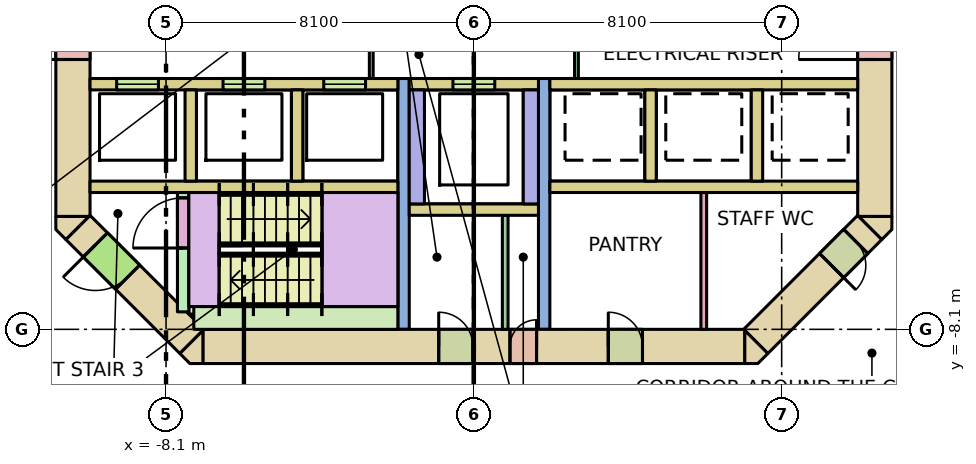
"""IFC4 building model, lengths in metres.
Left out: names, types, materials, properties, quantities, classifications, styles, units other than length and angle.
Written with IfcOpenShell. Run it as: python <this file> out.ifc"""

import sys

from ifc_helpers import new_model, si_unit, direction, frame, frame_2d, origin, place, context, subcontext, project, spatial, polyline, rectangle, outline, extrude, element, fill, save


model = new_model("IFC4")
c1 = context("Model", 3, precision=1e-05, world=origin(), true_north=direction((0.0, 1.0)))
c2 = subcontext(c1, "Body", "Model", "MODEL_VIEW")
j1 = project(units=[si_unit("LENGTHUNIT", "METRE"), si_unit("PLANEANGLEUNIT", "RADIAN")], contexts=[c1])
p1 = place(None, origin())
s1 = spatial("IfcSite", under=j1, at=p1, CompositionType="ELEMENT")
p2 = place(p1, origin())
s2 = spatial("IfcBuilding", under=s1, at=p2, CompositionType="ELEMENT")
p3 = place(p2, frame((0.0, 0.0, 6.0)))
s3 = spatial("IfcBuildingStorey", under=s2, at=p3, CompositionType="ELEMENT", Elevation=6.0)
p4 = place(p3, frame((-7.13, -8.55, -0.32), z_axis=(0.0, 0.0, 1.0), x_axis=(1.0, 0.0, 0.0)))
e1 = element("IfcWall", 1, at=p4, inside=s3, PredefinedType="SHEAR", context=c2, shape_type="SweptSolid", body=[
    extrude(rectangle(XDim=14.26, YDim=0.9, at=frame_2d((7.13, 0.0))), origin(), (0.0, 0.0, 1.0), 7.0),
])
p5 = place(p4, frame((8.08, 0.0, 0.32)))
e2 = element("IfcOpeningElement", 2, at=p5, cuts=e1, PredefinedType="OPENING", context=c2, shape_type="SweptSolid", body=[
    extrude(rectangle(XDim=0.7, YDim=2.1, at=frame_2d((0.35, 1.05))), frame((0.0, 0.46, 0.0), z_axis=(0.0, -1.0, 0.0), x_axis=(1.0, 0.0, 0.0)), (0.0, 0.0, 1.0), 0.92),
])
p6 = place(p4, frame((6.205, 0.0, 0.32)))
e3 = element("IfcOpeningElement", 3, at=p6, cuts=e1, PredefinedType="OPENING", context=c2, shape_type="SweptSolid", body=[
    extrude(rectangle(XDim=0.9, YDim=2.1, at=frame_2d((0.45, 1.05))), frame((0.0, 0.46, 0.0), z_axis=(0.0, -1.0, 0.0), x_axis=(1.0, 0.0, 0.0)), (0.0, 0.0, 1.0), 0.92),
])
p7 = place(p4, frame((10.667, 0.0, 0.32)))
e4 = element("IfcOpeningElement", 4, at=p7, cuts=e1, PredefinedType="OPENING", context=c2, shape_type="SweptSolid", body=[
    extrude(rectangle(XDim=0.9, YDim=2.1, at=frame_2d((0.45, 1.05))), frame((0.0, 0.46, 0.0), z_axis=(0.0, -1.0, 0.0), x_axis=(1.0, 0.0, 0.0)), (0.0, 0.0, 1.0), 0.92),
])
p8 = place(p3, frame((-10.55, -5.13, -0.32), z_axis=(0.0, 0.0, 1.0), x_axis=(0.0, 1.0, 0.0)))
e5 = element("IfcWall", 5, at=p8, inside=s3, PredefinedType="SHEAR", context=c2, shape_type="SweptSolid", body=[
    extrude(rectangle(XDim=10.26, YDim=0.9, at=frame_2d((5.13, 0.0))), origin(), (0.0, 0.0, 1.0), 7.0),
])
p9 = place(p8, frame((4.13, 0.0, 0.32)))
e6 = element("IfcOpeningElement", 6, at=p9, cuts=e5, PredefinedType="OPENING", context=c2, shape_type="SweptSolid", body=[
    extrude(rectangle(XDim=2.0, YDim=2.1, at=frame_2d((1.0, 1.05))), frame((0.0, 0.46, 0.0), z_axis=(0.0, -1.0, 0.0), x_axis=(1.0, 0.0, 0.0)), (0.0, 0.0, 1.0), 0.92),
])
p10 = place(p3, frame((10.55, -5.13, -0.32), z_axis=(0.0, 0.0, 1.0), x_axis=(0.0, 1.0, 0.0)))
e7 = element("IfcWall", 7, at=p10, inside=s3, PredefinedType="SHEAR", context=c2, shape_type="SweptSolid", body=[
    extrude(rectangle(XDim=10.26, YDim=0.9, at=frame_2d((5.13, 0.0))), origin(), (0.0, 0.0, 1.0), 7.0),
])
p11 = place(p10, frame((4.13, 0.0, 0.32)))
e8 = element("IfcOpeningElement", 8, at=p11, cuts=e7, PredefinedType="OPENING", context=c2, shape_type="SweptSolid", body=[
    extrude(rectangle(XDim=2.0, YDim=2.1, at=frame_2d((1.0, 1.05))), frame((0.0, 0.46, 0.0), z_axis=(0.0, -1.0, 0.0), x_axis=(1.0, 0.0, 0.0)), (0.0, 0.0, 1.0), 0.92),
])
p12 = place(p3, frame((10.418, -5.418, -0.32), z_axis=(0.0, 0.0, 1.0), x_axis=(-0.707106781187, -0.707106781187, 0.0)))
e9 = element("IfcWall", 9, at=p12, inside=s3, PredefinedType="SHEAR", context=c2, shape_type="SweptSolid", body=[
    extrude(rectangle(XDim=4.243, YDim=0.9, at=frame_2d((2.121, 0.0))), origin(), (0.0, 0.0, 1.0), 7.0),
])
p13 = place(p12, frame((0.52, 0.0, 0.32)))
e10 = element("IfcOpeningElement", 10, at=p13, cuts=e9, PredefinedType="OPENING", context=c2, shape_type="SweptSolid", body=[
    extrude(rectangle(XDim=0.9, YDim=2.1, at=frame_2d((0.45, 1.05))), frame((0.0, 0.46, 0.0), z_axis=(0.0, -1.0, 0.0), x_axis=(1.0, 0.0, 0.0)), (0.0, 0.0, 1.0), 0.92),
])
p14 = place(p3, frame((-7.418, -8.418, -0.32), z_axis=(0.0, 0.0, 1.0), x_axis=(-0.707106781187, 0.707106781187, 0.0)))
e11 = element("IfcWall", 11, at=p14, inside=s3, PredefinedType="SHEAR", context=c2, shape_type="SweptSolid", body=[
    extrude(rectangle(XDim=4.243, YDim=0.9, at=frame_2d((2.121, 0.0))), origin(), (0.0, 0.0, 1.0), 7.0),
])
p15 = place(p14, frame((2.393, 0.0, 0.32)))
e12 = element("IfcOpeningElement", 12, at=p15, cuts=e11, PredefinedType="OPENING", context=c2, shape_type="SweptSolid", body=[
    extrude(rectangle(XDim=1.2, YDim=2.1, at=frame_2d((0.6, 1.05))), frame((0.0, 0.46, 0.0), z_axis=(0.0, -1.0, 0.0), x_axis=(1.0, 0.0, 0.0)), (0.0, 0.0, 1.0), 0.92),
])
p16 = place(p3, frame((0.0, 0.0, -0.32)))
e13 = element("IfcWall", 13, at=p16, inside=s3, PredefinedType="SHEAR", context=c2, shape_type="SweptSolid", body=[
    extrude(outline(polyline([(-7.473, -9.0), (-7.736, -8.736), (-7.13, -8.13), (-7.13, -9.0), (-7.473, -9.0)])), origin(), (0.0, 0.0, 1.0), 7.0),
])
p17 = place(p3, frame((0.0, 0.0, -0.32)))
e14 = element("IfcWall", 14, at=p17, inside=s3, PredefinedType="SHEAR", context=c2, shape_type="SweptSolid", body=[
    extrude(outline(polyline([(7.473, -9.0), (7.13, -9.0), (7.13, -8.13), (7.736, -8.736), (7.473, -9.0)])), origin(), (0.0, 0.0, 1.0), 7.0),
])
p18 = place(p3, frame((0.0, 0.0, -0.32)))
e15 = element("IfcWall", 15, at=p18, inside=s3, PredefinedType="SHEAR", context=c2, shape_type="SweptSolid", body=[
    extrude(outline(polyline([(-11.0, -5.473), (-11.0, -5.13), (-10.13, -5.13), (-10.736, -5.736), (-11.0, -5.473)])), origin(), (0.0, 0.0, 1.0), 7.0),
])
p19 = place(p3, frame((0.0, 0.0, -0.32)))
e16 = element("IfcWall", 16, at=p19, inside=s3, PredefinedType="SHEAR", context=c2, shape_type="SweptSolid", body=[
    extrude(outline(polyline([(11.0, -5.473), (10.736, -5.736), (10.13, -5.13), (11.0, -5.13), (11.0, -5.473)])), origin(), (0.0, 0.0, 1.0), 7.0),
])
for number, where, z_axis, x_axis in (
    (17, (-10.1, -4.35, 0.0), (0.0, 0.0, 1.0), (1.0, 0.0, 0.0)),
    (18, (2.0, -4.35, 0.0), (0.0, 0.0, 1.0), (1.0, 0.0, 0.0)),
):
    element("IfcWall", number, at=place(p3, frame(where, z_axis=z_axis, x_axis=x_axis)), inside=s3, PredefinedType="SOLIDWALL", context=c2, shape_type="SweptSolid", body=[
        extrude(rectangle(XDim=8.1, YDim=0.3, at=frame_2d((4.05, 0.0))), origin(), (0.0, 0.0, 1.0), 6.68),
    ])
p20 = place(p3, frame((-10.1, -1.65, 0.0), z_axis=(0.0, 0.0, 1.0), x_axis=(1.0, 0.0, 0.0)))
e19 = element("IfcWall", 19, at=p20, inside=s3, PredefinedType="SOLIDWALL", context=c2, shape_type="SweptSolid", body=[
    extrude(rectangle(XDim=8.1, YDim=0.3, at=frame_2d((4.05, 0.0))), origin(), (0.0, 0.0, 1.0), 6.68),
])
p21 = place(p20, frame((0.7, 0.0, 0.0)))
e20 = element("IfcOpeningElement", 20, at=p21, cuts=e19, PredefinedType="OPENING", context=c2, shape_type="SweptSolid", body=[
    extrude(rectangle(XDim=1.1, YDim=2.1, at=frame_2d((0.55, 1.05))), frame((0.0, 0.16, 0.0), z_axis=(0.0, -1.0, 0.0), x_axis=(1.0, 0.0, 0.0)), (0.0, 0.0, 1.0), 0.32),
])
p22 = place(p20, frame((3.5, 0.0, 0.0)))
e21 = element("IfcOpeningElement", 21, at=p22, cuts=e19, PredefinedType="OPENING", context=c2, shape_type="SweptSolid", body=[
    extrude(rectangle(XDim=1.1, YDim=2.1, at=frame_2d((0.55, 1.05))), frame((0.0, 0.16, 0.0), z_axis=(0.0, -1.0, 0.0), x_axis=(1.0, 0.0, 0.0)), (0.0, 0.0, 1.0), 0.32),
])
p23 = place(p20, frame((6.15, 0.0, 0.0)))
e22 = element("IfcOpeningElement", 22, at=p23, cuts=e19, PredefinedType="OPENING", context=c2, shape_type="SweptSolid", body=[
    extrude(rectangle(XDim=1.1, YDim=2.1, at=frame_2d((0.55, 1.05))), frame((0.0, 0.16, 0.0), z_axis=(0.0, -1.0, 0.0), x_axis=(1.0, 0.0, 0.0)), (0.0, 0.0, 1.0), 0.32),
])
p24 = place(p3, frame((2.0, -1.65, 0.0), z_axis=(0.0, 0.0, 1.0), x_axis=(1.0, 0.0, 0.0)))
e23 = element("IfcWall", 23, at=p24, inside=s3, PredefinedType="SOLIDWALL", context=c2, shape_type="SweptSolid", body=[
    extrude(rectangle(XDim=8.1, YDim=0.3, at=frame_2d((4.05, 0.0))), origin(), (0.0, 0.0, 1.0), 6.68),
])
for number, where, z_axis, x_axis in (
    (24, (-7.45, -4.2, 0.0), (0.0, 0.0, 1.0), (0.0, 1.0, 0.0)),
    (25, (-4.65, -4.2, 0.0), (0.0, 0.0, 1.0), (0.0, 1.0, 0.0)),
    (26, (4.65, -4.2, 0.0), (0.0, 0.0, 1.0), (0.0, 1.0, 0.0)),
    (27, (7.45, -4.2, 0.0), (0.0, 0.0, 1.0), (0.0, 1.0, 0.0)),
):
    element("IfcWall", number, at=place(p3, frame(where, z_axis=z_axis, x_axis=x_axis)), inside=s3, PredefinedType="SOLIDWALL", context=c2, shape_type="SweptSolid", body=[
        extrude(rectangle(XDim=2.4, YDim=0.3, at=frame_2d((1.2, 0.0))), origin(), (0.0, 0.0, 1.0), 6.68),
    ])
for number, where, z_axis, x_axis in (
    (28, (-1.85, -8.1, 0.0), (0.0, 0.0, 1.0), (0.0, 1.0, 0.0)),
    (29, (1.85, -8.1, 0.0), (0.0, 0.0, 1.0), (0.0, 1.0, 0.0)),
):
    element("IfcWall", number, at=place(p3, frame(where, z_axis=z_axis, x_axis=x_axis)), inside=s3, PredefinedType="SHEAR", context=c2, shape_type="SweptSolid", body=[
        extrude(rectangle(XDim=6.6, YDim=0.3, at=frame_2d((3.3, 0.0))), origin(), (0.0, 0.0, 1.0), 6.68),
    ])
p25 = place(p3, frame((-1.7, -1.65, 0.0), z_axis=(0.0, 0.0, 1.0), x_axis=(1.0, 0.0, 0.0)))
e30 = element("IfcWall", 30, at=p25, inside=s3, PredefinedType="SOLIDWALL", context=c2, shape_type="SweptSolid", body=[
    extrude(rectangle(XDim=3.4, YDim=0.3, at=frame_2d((1.7, 0.0))), origin(), (0.0, 0.0, 1.0), 6.68),
])
p26 = place(p25, frame((1.15, 0.0, 0.0)))
e31 = element("IfcOpeningElement", 31, at=p26, cuts=e30, PredefinedType="OPENING", context=c2, shape_type="SweptSolid", body=[
    extrude(rectangle(XDim=1.1, YDim=2.1, at=frame_2d((0.55, 1.05))), frame((0.0, 0.16, 0.0), z_axis=(0.0, -1.0, 0.0), x_axis=(1.0, 0.0, 0.0)), (0.0, 0.0, 1.0), 0.32),
])
for number, where, z_axis, x_axis in (
    (32, (-1.5, -4.8, 0.0), (0.0, 0.0, 1.0), (0.0, 1.0, 0.0)),
    (33, (1.5, -4.8, 0.0), (0.0, 0.0, 1.0), (0.0, 1.0, 0.0)),
):
    element("IfcWall", number, at=place(p3, frame(where, z_axis=z_axis, x_axis=x_axis)), inside=s3, PredefinedType="SOLIDWALL", context=c2, shape_type="SweptSolid", body=[
        extrude(rectangle(XDim=3.0, YDim=0.4, at=frame_2d((1.5, 0.0))), origin(), (0.0, 0.0, 1.0), 6.68),
    ])
p27 = place(p3, frame((-1.7, -4.95, 0.0), z_axis=(0.0, 0.0, 1.0), x_axis=(1.0, 0.0, 0.0)))
e34 = element("IfcWall", 34, at=p27, inside=s3, PredefinedType="SOLIDWALL", context=c2, shape_type="SweptSolid", body=[
    extrude(rectangle(XDim=3.4, YDim=0.3, at=frame_2d((1.7, 0.0))), origin(), (0.0, 0.0, 1.0), 6.68),
])
p28 = place(p3, frame((-7.65, -7.64, 0.0), z_axis=(0.0, 0.0, 1.0), x_axis=(0.0, 1.0, 0.0)))
e35 = element("IfcWall", 35, at=p28, inside=s3, PredefinedType="SHEAR", context=c2, shape_type="SweptSolid", body=[
    extrude(rectangle(XDim=3.14, YDim=0.3, at=frame_2d((1.57, 0.0))), origin(), (0.0, 0.0, 1.0), 6.68),
])
p29 = place(p28, frame((1.68, 0.0, 0.0)))
e36 = element("IfcOpeningElement", 36, at=p29, cuts=e35, PredefinedType="OPENING", context=c2, shape_type="SweptSolid", body=[
    extrude(rectangle(XDim=1.32, YDim=2.1, at=frame_2d((0.66, 1.05))), frame((0.0, 0.16, 0.0), z_axis=(0.0, -1.0, 0.0), x_axis=(1.0, 0.0, 0.0)), (0.0, 0.0, 1.0), 0.32),
])
p30 = place(p3, frame((-7.5, -7.6, 0.0), z_axis=(0.0, 0.0, 1.0), x_axis=(1.0, 0.0, 0.0)))
e37 = element("IfcWall", 37, at=p30, inside=s3, PredefinedType="SHEAR", context=c2, shape_type="SweptSolid", body=[
    extrude(rectangle(XDim=0.6, YDim=0.2, at=frame_2d((0.3, 0.0))), origin(), (0.0, 0.0, 1.0), 6.68),
])
p31 = place(p3, frame((-7.37, -7.8, 0.0), z_axis=(0.0, 0.0, 1.0), x_axis=(1.0, 0.0, 0.0)))
e38 = element("IfcWall", 38, at=p31, inside=s3, PredefinedType="SHEAR", context=c2, shape_type="SweptSolid", body=[
    extrude(rectangle(XDim=5.37, YDim=0.6, at=frame_2d((2.685, 0.0))), origin(), (0.0, 0.0, 1.0), 6.68),
])
p32 = place(p3, frame((-2.7, -1.5, 0.0), z_axis=(0.0, 0.0, 1.0), x_axis=(0.0, 1.0, 0.0)))
e39 = element("IfcWall", 39, at=p32, inside=s3, PredefinedType="PARTITIONING", context=c2, shape_type="SweptSolid", body=[
    extrude(rectangle(XDim=3.0, YDim=0.1, at=frame_2d((1.5, 0.0))), origin(), (0.0, 0.0, 1.0), 6.68),
])
p33 = place(p32, frame((0.9, 0.0, 0.0)))
e40 = element("IfcOpeningElement", 40, at=p33, cuts=e39, PredefinedType="OPENING", context=c2, shape_type="SweptSolid", body=[
    extrude(rectangle(XDim=1.2, YDim=2.1, at=frame_2d((0.6, 1.05))), frame((0.0, 0.06, 0.0), z_axis=(0.0, -1.0, 0.0), x_axis=(1.0, 0.0, 0.0)), (0.0, 0.0, 1.0), 0.12),
])
p34 = place(p3, frame((2.7, -1.5, 0.0), z_axis=(0.0, 0.0, 1.0), x_axis=(0.0, 1.0, 0.0)))
e41 = element("IfcWall", 41, at=p34, inside=s3, PredefinedType="PARTITIONING", context=c2, shape_type="SweptSolid", body=[
    extrude(rectangle(XDim=3.0, YDim=0.1, at=frame_2d((1.5, 0.0))), origin(), (0.0, 0.0, 1.0), 6.68),
])
p35 = place(p34, frame((0.9, 0.0, 0.0)))
e42 = element("IfcOpeningElement", 42, at=p35, cuts=e41, PredefinedType="OPENING", context=c2, shape_type="SweptSolid", body=[
    extrude(rectangle(XDim=1.2, YDim=2.1, at=frame_2d((0.6, 1.05))), frame((0.0, 0.06, 0.0), z_axis=(0.0, -1.0, 0.0), x_axis=(1.0, 0.0, 0.0)), (0.0, 0.0, 1.0), 0.12),
])
p36 = place(p3, frame((0.825, -8.1, 0.0), z_axis=(0.0, 0.0, 1.0), x_axis=(0.0, 1.0, 0.0)))
e43 = element("IfcWall", 43, at=p36, inside=s3, PredefinedType="PARTITIONING", context=c2, shape_type="SweptSolid", body=[
    extrude(rectangle(XDim=3.0, YDim=0.15, at=frame_2d((1.5, 0.0))), origin(), (0.0, 0.0, 1.0), 6.68),
])
p37 = place(p3, frame((6.05, -8.1, 0.0), z_axis=(0.0, 0.0, 1.0), x_axis=(0.0, 1.0, 0.0)))
e44 = element("IfcWall", 44, at=p37, inside=s3, PredefinedType="PARTITIONING", context=c2, shape_type="SweptSolid", body=[
    extrude(rectangle(XDim=3.6, YDim=0.15, at=frame_2d((1.8, 0.0))), origin(), (0.0, 0.0, 1.0), 6.68),
])
p38 = place(p21, origin())
e45 = element("IfcDoor", 45, at=p38, inside=s3, OperationType="DOUBLE_DOOR_SLIDING", PredefinedType="DOOR", context=c2, shape_type="SweptSolid", body=[
    extrude(rectangle(XDim=1.1, YDim=2.1, at=frame_2d((0.55, 1.05))), frame((0.0, 0.025, 0.0), z_axis=(0.0, -1.0, 0.0), x_axis=(1.0, 0.0, 0.0)), (0.0, 0.0, 1.0), 0.05),
])
fill(e20, e45)
p39 = place(p22, origin())
e46 = element("IfcDoor", 46, at=p39, inside=s3, OperationType="DOUBLE_DOOR_SLIDING", PredefinedType="DOOR", context=c2, shape_type="SweptSolid", body=[
    extrude(rectangle(XDim=1.1, YDim=2.1, at=frame_2d((0.55, 1.05))), frame((0.0, 0.025, 0.0), z_axis=(0.0, -1.0, 0.0), x_axis=(1.0, 0.0, 0.0)), (0.0, 0.0, 1.0), 0.05),
])
fill(e21, e46)
p40 = place(p23, origin())
e47 = element("IfcDoor", 47, at=p40, inside=s3, OperationType="DOUBLE_DOOR_SLIDING", PredefinedType="DOOR", context=c2, shape_type="SweptSolid", body=[
    extrude(rectangle(XDim=1.1, YDim=2.1, at=frame_2d((0.55, 1.05))), frame((0.0, 0.025, 0.0), z_axis=(0.0, -1.0, 0.0), x_axis=(1.0, 0.0, 0.0)), (0.0, 0.0, 1.0), 0.05),
])
fill(e22, e47)
p41 = place(p26, origin())
e48 = element("IfcDoor", 48, at=p41, inside=s3, OperationType="DOUBLE_DOOR_SLIDING", PredefinedType="DOOR", context=c2, shape_type="SweptSolid", body=[
    extrude(rectangle(XDim=1.1, YDim=2.1, at=frame_2d((0.55, 1.05))), frame((0.0, 0.025, 0.0), z_axis=(0.0, -1.0, 0.0), x_axis=(1.0, 0.0, 0.0)), (0.0, 0.0, 1.0), 0.05),
])
fill(e31, e48)
p42 = place(p29, origin())
e49 = element("IfcDoor", 49, at=p42, inside=s3, OperationType="DOUBLE_DOOR_SINGLE_SWING", PredefinedType="DOOR", context=c2, shape_type="SweptSolid", body=[
    extrude(rectangle(XDim=1.32, YDim=2.1, at=frame_2d((0.66, 1.05))), frame((0.0, 0.025, 0.0), z_axis=(0.0, -1.0, 0.0), x_axis=(1.0, 0.0, 0.0)), (0.0, 0.0, 1.0), 0.05),
])
fill(e36, e49)
p43 = place(p15, origin())
e50 = element("IfcDoor", 50, at=p43, inside=s3, OperationType="SINGLE_SWING_RIGHT", PredefinedType="DOOR", context=c2, shape_type="SweptSolid", body=[
    extrude(rectangle(XDim=1.2, YDim=2.1, at=frame_2d((0.6, 1.05))), frame((0.0, 0.025, 0.0), z_axis=(0.0, -1.0, 0.0), x_axis=(1.0, 0.0, 0.0)), (0.0, 0.0, 1.0), 0.05),
])
fill(e12, e50)
p44 = place(p9, origin())
e51 = element("IfcDoor", 51, at=p44, inside=s3, OperationType="DOUBLE_DOOR_SINGLE_SWING", PredefinedType="DOOR", context=c2, shape_type="SweptSolid", body=[
    extrude(rectangle(XDim=2.0, YDim=2.1, at=frame_2d((1.0, 1.05))), frame((0.0, 0.025, 0.0), z_axis=(0.0, -1.0, 0.0), x_axis=(1.0, 0.0, 0.0)), (0.0, 0.0, 1.0), 0.05),
])
fill(e6, e51)
p45 = place(p11, origin())
e52 = element("IfcDoor", 52, at=p45, inside=s3, OperationType="DOUBLE_DOOR_SINGLE_SWING", PredefinedType="DOOR", context=c2, shape_type="SweptSolid", body=[
    extrude(rectangle(XDim=2.0, YDim=2.1, at=frame_2d((1.0, 1.05))), frame((0.0, 0.025, 0.0), z_axis=(0.0, -1.0, 0.0), x_axis=(1.0, 0.0, 0.0)), (0.0, 0.0, 1.0), 0.05),
])
fill(e8, e52)
p46 = place(p5, origin())
e53 = element("IfcDoor", 53, at=p46, inside=s3, OperationType="SINGLE_SWING_RIGHT", PredefinedType="DOOR", context=c2, shape_type="SweptSolid", body=[
    extrude(rectangle(XDim=0.7, YDim=2.1, at=frame_2d((0.35, 1.05))), frame((0.0, 0.025, 0.0), z_axis=(0.0, -1.0, 0.0), x_axis=(1.0, 0.0, 0.0)), (0.0, 0.0, 1.0), 0.05),
])
fill(e2, e53)
p47 = place(p6, origin())
e54 = element("IfcDoor", 54, at=p47, inside=s3, OperationType="SINGLE_SWING_LEFT", PredefinedType="DOOR", context=c2, shape_type="SweptSolid", body=[
    extrude(rectangle(XDim=0.9, YDim=2.1, at=frame_2d((0.45, 1.05))), frame((0.0, 0.025, 0.0), z_axis=(0.0, -1.0, 0.0), x_axis=(1.0, 0.0, 0.0)), (0.0, 0.0, 1.0), 0.05),
])
fill(e3, e54)
p48 = place(p7, origin())
e55 = element("IfcDoor", 55, at=p48, inside=s3, OperationType="SINGLE_SWING_LEFT", PredefinedType="DOOR", context=c2, shape_type="SweptSolid", body=[
    extrude(rectangle(XDim=0.9, YDim=2.1, at=frame_2d((0.45, 1.05))), frame((0.0, 0.025, 0.0), z_axis=(0.0, -1.0, 0.0), x_axis=(1.0, 0.0, 0.0)), (0.0, 0.0, 1.0), 0.05),
])
fill(e4, e55)
p49 = place(p13, origin())
e56 = element("IfcDoor", 56, at=p49, inside=s3, OperationType="SINGLE_SWING_RIGHT", PredefinedType="DOOR", context=c2, shape_type="SweptSolid", body=[
    extrude(rectangle(XDim=0.9, YDim=2.1, at=frame_2d((0.45, 1.05))), frame((0.0, 0.025, 0.0), z_axis=(0.0, -1.0, 0.0), x_axis=(1.0, 0.0, 0.0)), (0.0, 0.0, 1.0), 0.05),
])
fill(e10, e56)
save(model, sys.argv[1])
